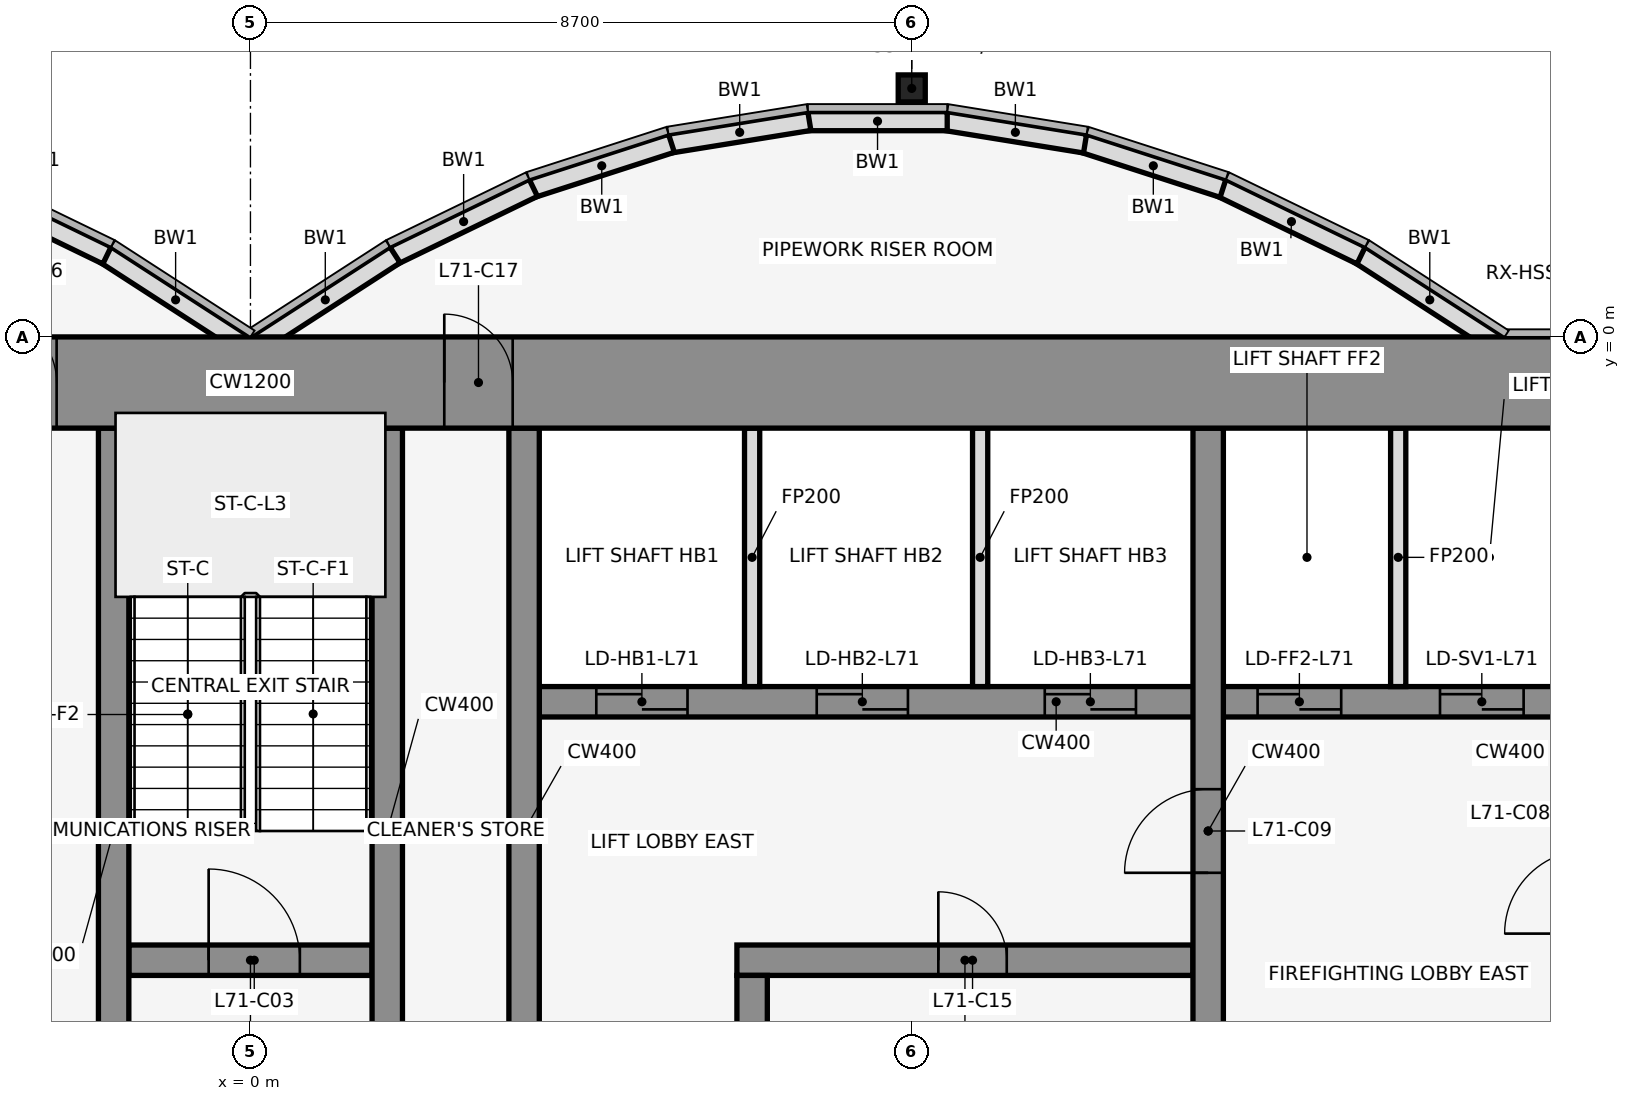
"""IFC4 building model, lengths in metres.
Left out: names, types, materials, properties, quantities, classifications, styles, units other than length and angle.
Written with IfcOpenShell. Run it as: python <this file> out.ifc"""

import sys

from ifc_helpers import new_model, si_unit, direction, frame, frame_2d, origin, origin_2d, place, context, subcontext, project, spatial, rectangle, hollow_rectangle, extrude, element, fill, save


model = new_model("IFC4")
c1 = context("Model", 3, precision=1e-05, world=origin(), true_north=direction((0.0, 1.0)))
c2 = subcontext(c1, "Body", "Model", "MODEL_VIEW")
j1 = project(units=[si_unit("LENGTHUNIT", "METRE"), si_unit("PLANEANGLEUNIT", "RADIAN")], contexts=[c1])
p1 = place(None, origin())
s1 = spatial("IfcSite", under=j1, at=p1, CompositionType="ELEMENT")
p2 = place(p1, origin())
s2 = spatial("IfcBuilding", under=s1, at=p2, CompositionType="ELEMENT")
p3 = place(p2, frame((0.0, 0.0, 315.5)))
s3 = spatial("IfcBuildingStorey", under=s2, at=p3, CompositionType="ELEMENT", Elevation=315.5)
p4 = place(p3, frame((8.7, 3.269, 0.0), z_axis=(0.0, 0.0, 1.0), x_axis=(1.0, 0.0, 0.0)))
e1 = element("IfcColumn", 1, at=p4, inside=s3, PredefinedType="COLUMN", context=c2, shape_type="SweptSolid", body=[
    extrude(hollow_rectangle(XDim=0.356, YDim=0.356, WallThickness=0.012, at=origin_2d()), origin(), (0.0, 0.0, 1.0), 4.5),
])
p5 = place(p3, frame((16.432, -0.105, 0.0), z_axis=(0.0, 0.0, 1.0), x_axis=(-0.83981312244, 0.542875602121, 0.0)))
e2 = element("IfcWall", 2, at=p5, inside=s3, PredefinedType="STANDARD", context=c2, shape_type="SweptSolid", body=[
    extrude(rectangle(XDim=2.183, YDim=0.25, at=frame_2d((1.091, 0.0))), origin(), (0.0, 0.0, 1.0), 4.35),
])
p6 = place(p3, frame((14.612, 1.073, 0.0), z_axis=(0.0, 0.0, 1.0), x_axis=(-0.89982408427, 0.436252928206, 0.0)))
e3 = element("IfcWall", 3, at=p6, inside=s3, PredefinedType="STANDARD", context=c2, shape_type="SweptSolid", body=[
    extrude(rectangle(XDim=2.038, YDim=0.25, at=frame_2d((1.019, 0.0))), origin(), (0.0, 0.0, 1.0), 4.35),
])
p7 = place(p3, frame((12.795, 1.955, 0.0), z_axis=(0.0, 0.0, 1.0), x_axis=(-0.951495806175, 0.307661714928, 0.0)))
e4 = element("IfcWall", 4, at=p7, inside=s3, PredefinedType="STANDARD", context=c2, shape_type="SweptSolid", body=[
    extrude(rectangle(XDim=1.927, YDim=0.25, at=frame_2d((0.963, 0.0))), origin(), (0.0, 0.0, 1.0), 4.35),
])
p8 = place(p3, frame((10.98, 2.543, 0.0), z_axis=(0.0, 0.0, 1.0), x_axis=(-0.987181718931, 0.159600293885, 0.0)))
e5 = element("IfcWall", 5, at=p8, inside=s3, PredefinedType="STANDARD", context=c2, shape_type="SweptSolid", body=[
    extrude(rectangle(XDim=1.857, YDim=0.25, at=frame_2d((0.929, 0.0))), origin(), (0.0, 0.0, 1.0), 4.35),
])
p9 = place(p3, frame((9.167, 2.838, 0.0), z_axis=(0.0, 0.0, 1.0), x_axis=(-1.0, 0.0, 0.0)))
e6 = element("IfcWall", 6, at=p9, inside=s3, PredefinedType="STANDARD", context=c2, shape_type="SweptSolid", body=[
    extrude(rectangle(XDim=1.833, YDim=0.25, at=frame_2d((0.917, 0.0))), origin(), (0.0, 0.0, 1.0), 4.35),
])
p10 = place(p3, frame((7.353, 2.84, 0.0), z_axis=(0.0, 0.0, 1.0), x_axis=(-0.987181718931, -0.159600293885, 0.0)))
e7 = element("IfcWall", 7, at=p10, inside=s3, PredefinedType="STANDARD", context=c2, shape_type="SweptSolid", body=[
    extrude(rectangle(XDim=1.857, YDim=0.25, at=frame_2d((0.929, 0.0))), origin(), (0.0, 0.0, 1.0), 4.35),
])
p11 = place(p3, frame((5.538, 2.548, 0.0), z_axis=(0.0, 0.0, 1.0), x_axis=(-0.951495806175, -0.307661714928, 0.0)))
e8 = element("IfcWall", 8, at=p11, inside=s3, PredefinedType="STANDARD", context=c2, shape_type="SweptSolid", body=[
    extrude(rectangle(XDim=1.927, YDim=0.25, at=frame_2d((0.963, 0.0))), origin(), (0.0, 0.0, 1.0), 4.35),
])
p12 = place(p3, frame((3.721, 1.962, 0.0), z_axis=(0.0, 0.0, 1.0), x_axis=(-0.89982408427, -0.436252928206, 0.0)))
e9 = element("IfcWall", 9, at=p12, inside=s3, PredefinedType="STANDARD", context=c2, shape_type="SweptSolid", body=[
    extrude(rectangle(XDim=2.038, YDim=0.25, at=frame_2d((1.019, 0.0))), origin(), (0.0, 0.0, 1.0), 4.35),
])
for number, where, z_axis, x_axis in (
    (10, (1.901, 1.08, 0.0), (0.0, 0.0, 1.0), (-0.84, -0.543, 0.0)),
    (11, (-0.068, -0.105, 0.0), (0.0, 0.0, 1.0), (-0.84, 0.543, 0.0)),
):
    element("IfcWall", number, at=place(p3, frame(where, z_axis=z_axis, x_axis=x_axis)), inside=s3, PredefinedType="STANDARD", context=c2, shape_type="SweptSolid", body=[
        extrude(rectangle(XDim=2.183, YDim=0.25, at=frame_2d((1.091, 0.0))), origin(), (0.0, 0.0, 1.0), 4.35),
    ])
p13 = place(p3, frame((-1.888, 1.073, 0.0), z_axis=(0.0, 0.0, 1.0), x_axis=(-0.89982408427, 0.436252928206, 0.0)))
e12 = element("IfcWall", 12, at=p13, inside=s3, PredefinedType="STANDARD", context=c2, shape_type="SweptSolid", body=[
    extrude(rectangle(XDim=2.038, YDim=0.25, at=frame_2d((1.019, 0.0))), origin(), (0.0, 0.0, 1.0), 4.35),
])
p14 = place(p3, frame((-1.6, -8.2, 0.0), z_axis=(0.0, 0.0, 1.0), x_axis=(1.0, 0.0, 0.0)))
e13 = element("IfcWall", 13, at=p14, inside=s3, PredefinedType="SHEAR", context=c2, shape_type="SweptSolid", body=[
    extrude(rectangle(XDim=3.2, YDim=0.4, at=frame_2d((1.6, 0.0))), origin(), (0.0, 0.0, 1.0), 4.5),
])
p15 = place(p14, frame((1.05, 0.0, 0.0)))
e14 = element("IfcOpeningElement", 14, at=p15, cuts=e13, PredefinedType="OPENING", context=c2, shape_type="SweptSolid", body=[
    extrude(rectangle(XDim=1.2, YDim=2.1, at=frame_2d((0.6, 1.05))), frame((0.0, 0.212, 0.0), z_axis=(0.0, -1.0, 0.0), x_axis=(1.0, 0.0, 0.0)), (0.0, 0.0, 1.0), 0.424),
])
p16 = place(p3, frame((6.4, -8.2, 0.0), z_axis=(0.0, 0.0, 1.0), x_axis=(1.0, 0.0, 0.0)))
e15 = element("IfcWall", 15, at=p16, inside=s3, PredefinedType="SHEAR", context=c2, shape_type="SweptSolid", body=[
    extrude(rectangle(XDim=6.0, YDim=0.4, at=frame_2d((3.0, 0.0))), origin(), (0.0, 0.0, 1.0), 4.5),
])
p17 = place(p16, frame((2.65, 0.0, 0.0)))
e16 = element("IfcOpeningElement", 16, at=p17, cuts=e15, PredefinedType="OPENING", context=c2, shape_type="SweptSolid", body=[
    extrude(rectangle(XDim=0.9, YDim=2.1, at=frame_2d((0.45, 1.05))), frame((0.0, 0.212, 0.0), z_axis=(0.0, -1.0, 0.0), x_axis=(1.0, 0.0, 0.0)), (0.0, 0.0, 1.0), 0.424),
])
p18 = place(p3, frame((3.8, -4.8, 0.0), z_axis=(0.0, 0.0, 1.0), x_axis=(1.0, 0.0, 0.0)))
e17 = element("IfcWall", 17, at=p18, inside=s3, PredefinedType="SHEAR", context=c2, shape_type="SweptSolid", body=[
    extrude(rectangle(XDim=13.6, YDim=0.4, at=frame_2d((6.8, 0.0))), origin(), (0.0, 0.0, 1.0), 4.5),
])
p19 = place(p18, frame((0.75, 0.0, 0.0)))
e18 = element("IfcOpeningElement", 18, at=p19, cuts=e17, PredefinedType="OPENING", context=c2, shape_type="SweptSolid", body=[
    extrude(rectangle(XDim=1.2, YDim=2.1, at=frame_2d((0.6, 1.05))), frame((0.0, 0.212, 0.0), z_axis=(0.0, -1.0, 0.0), x_axis=(1.0, 0.0, 0.0)), (0.0, 0.0, 1.0), 0.424),
])
p20 = place(p18, frame((3.65, 0.0, 0.0)))
e19 = element("IfcOpeningElement", 19, at=p20, cuts=e17, PredefinedType="OPENING", context=c2, shape_type="SweptSolid", body=[
    extrude(rectangle(XDim=1.2, YDim=2.1, at=frame_2d((0.6, 1.05))), frame((0.0, 0.212, 0.0), z_axis=(0.0, -1.0, 0.0), x_axis=(1.0, 0.0, 0.0)), (0.0, 0.0, 1.0), 0.424),
])
p21 = place(p18, frame((6.65, 0.0, 0.0)))
e20 = element("IfcOpeningElement", 20, at=p21, cuts=e17, PredefinedType="OPENING", context=c2, shape_type="SweptSolid", body=[
    extrude(rectangle(XDim=1.2, YDim=2.1, at=frame_2d((0.6, 1.05))), frame((0.0, 0.212, 0.0), z_axis=(0.0, -1.0, 0.0), x_axis=(1.0, 0.0, 0.0)), (0.0, 0.0, 1.0), 0.424),
])
p22 = place(p18, frame((9.45, 0.0, 0.0)))
e21 = element("IfcOpeningElement", 21, at=p22, cuts=e17, PredefinedType="OPENING", context=c2, shape_type="SweptSolid", body=[
    extrude(rectangle(XDim=1.1, YDim=2.1, at=frame_2d((0.55, 1.05))), frame((0.0, 0.212, 0.0), z_axis=(0.0, -1.0, 0.0), x_axis=(1.0, 0.0, 0.0)), (0.0, 0.0, 1.0), 0.424),
])
p23 = place(p18, frame((11.85, 0.0, 0.0)))
e22 = element("IfcOpeningElement", 22, at=p23, cuts=e17, PredefinedType="OPENING", context=c2, shape_type="SweptSolid", body=[
    extrude(rectangle(XDim=1.1, YDim=2.1, at=frame_2d((0.55, 1.05))), frame((0.0, 0.212, 0.0), z_axis=(0.0, -1.0, 0.0), x_axis=(1.0, 0.0, 0.0)), (0.0, 0.0, 1.0), 0.424),
])
for number, where, z_axis, x_axis in (
    (23, (-1.8, -11.8, 0.0), (0.0, 0.0, 1.0), (0.0, 1.0, 0.0)),
    (24, (1.8, -11.8, 0.0), (0.0, 0.0, 1.0), (0.0, 1.0, 0.0)),
):
    element("IfcWall", number, at=place(p3, frame(where, z_axis=z_axis, x_axis=x_axis)), inside=s3, PredefinedType="SHEAR", context=c2, shape_type="SweptSolid", body=[
        extrude(rectangle(XDim=10.6, YDim=0.4, at=frame_2d((5.3, 0.0))), origin(), (0.0, 0.0, 1.0), 4.5),
    ])
p24 = place(p3, frame((3.6, -11.8, 0.0), z_axis=(0.0, 0.0, 1.0), x_axis=(0.0, 1.0, 0.0)))
e25 = element("IfcWall", 25, at=p24, inside=s3, PredefinedType="SHEAR", context=c2, shape_type="SweptSolid", body=[
    extrude(rectangle(XDim=10.6, YDim=0.4, at=frame_2d((5.3, 0.0))), origin(), (0.0, 0.0, 1.0), 4.5),
])
p25 = place(p24, frame((1.35, 0.0, 0.0)))
e26 = element("IfcOpeningElement", 26, at=p25, cuts=e25, PredefinedType="OPENING", context=c2, shape_type="SweptSolid", body=[
    extrude(rectangle(XDim=0.9, YDim=2.1, at=frame_2d((0.45, 1.05))), frame((0.0, 0.212, 0.0), z_axis=(0.0, -1.0, 0.0), x_axis=(1.0, 0.0, 0.0)), (0.0, 0.0, 1.0), 0.424),
])
p26 = place(p3, frame((6.6, -11.8, 0.0), z_axis=(0.0, 0.0, 1.0), x_axis=(0.0, 1.0, 0.0)))
e27 = element("IfcWall", 27, at=p26, inside=s3, PredefinedType="SHEAR", context=c2, shape_type="SweptSolid", body=[
    extrude(rectangle(XDim=3.4, YDim=0.4, at=frame_2d((1.7, 0.0))), origin(), (0.0, 0.0, 1.0), 4.5),
])
for number, where, z_axis, x_axis in (
    (28, (6.6, -4.6, 0.0), (0.0, 0.0, 1.0), (0.0, 1.0, 0.0)),
    (29, (9.6, -4.6, 0.0), (0.0, 0.0, 1.0), (0.0, 1.0, 0.0)),
):
    element("IfcWall", number, at=place(p3, frame(where, z_axis=z_axis, x_axis=x_axis)), inside=s3, PredefinedType="PARTITIONING", context=c2, shape_type="SweptSolid", body=[
        extrude(rectangle(XDim=3.4, YDim=0.2, at=frame_2d((1.7, 0.0))), origin(), (0.0, 0.0, 1.0), 3.418),
    ])
p27 = place(p3, frame((12.6, -11.8, 0.0), z_axis=(0.0, 0.0, 1.0), x_axis=(0.0, 1.0, 0.0)))
e30 = element("IfcWall", 30, at=p27, inside=s3, PredefinedType="SHEAR", context=c2, shape_type="SweptSolid", body=[
    extrude(rectangle(XDim=10.6, YDim=0.4, at=frame_2d((5.3, 0.0))), origin(), (0.0, 0.0, 1.0), 4.5),
])
p28 = place(p27, frame((4.75, 0.0, 0.0)))
e31 = element("IfcOpeningElement", 31, at=p28, cuts=e30, PredefinedType="OPENING", context=c2, shape_type="SweptSolid", body=[
    extrude(rectangle(XDim=1.1, YDim=2.1, at=frame_2d((0.55, 1.05))), frame((0.0, 0.212, 0.0), z_axis=(0.0, -1.0, 0.0), x_axis=(1.0, 0.0, 0.0)), (0.0, 0.0, 1.0), 0.424),
])
p29 = place(p3, frame((15.1, -4.6, 0.0), z_axis=(0.0, 0.0, 1.0), x_axis=(0.0, 1.0, 0.0)))
e32 = element("IfcWall", 32, at=p29, inside=s3, PredefinedType="PARTITIONING", context=c2, shape_type="SweptSolid", body=[
    extrude(rectangle(XDim=3.4, YDim=0.2, at=frame_2d((1.7, 0.0))), origin(), (0.0, 0.0, 1.0), 3.418),
])
p30 = place(p3, frame((-22.0, -0.6, 0.0), z_axis=(0.0, 0.0, 1.0), x_axis=(1.0, 0.0, 0.0)))
e33 = element("IfcWall", 33, at=p30, inside=s3, PredefinedType="SHEAR", context=c2, shape_type="SweptSolid", body=[
    extrude(rectangle(XDim=44.0, YDim=1.2, at=frame_2d((22.0, 0.0))), origin(), (0.0, 0.0, 1.0), 4.5),
])
p31 = place(p30, frame((18.55, 0.0, 0.0)))
e34 = element("IfcOpeningElement", 34, at=p31, cuts=e33, PredefinedType="OPENING", context=c2, shape_type="SweptSolid", body=[
    extrude(rectangle(XDim=0.9, YDim=2.1, at=frame_2d((0.45, 1.05))), frame((0.0, 0.612, 0.0), z_axis=(0.0, -1.0, 0.0), x_axis=(1.0, 0.0, 0.0)), (0.0, 0.0, 1.0), 1.224),
])
p32 = place(p30, frame((24.55, 0.0, 0.0)))
e35 = element("IfcOpeningElement", 35, at=p32, cuts=e33, PredefinedType="OPENING", context=c2, shape_type="SweptSolid", body=[
    extrude(rectangle(XDim=0.9, YDim=2.1, at=frame_2d((0.45, 1.05))), frame((0.0, 0.612, 0.0), z_axis=(0.0, -1.0, 0.0), x_axis=(1.0, 0.0, 0.0)), (0.0, 0.0, 1.0), 1.224),
])
p33 = place(p15, origin())
e36 = element("IfcDoor", 36, at=p33, inside=s3, OperationType="SINGLE_SWING_LEFT", PredefinedType="DOOR", context=c2, shape_type="SweptSolid", body=[
    extrude(rectangle(XDim=1.2, YDim=2.1, at=frame_2d((0.6, 1.05))), frame((0.0, 0.025, 0.0), z_axis=(0.0, -1.0, 0.0), x_axis=(1.0, 0.0, 0.0)), (0.0, 0.0, 1.0), 0.05),
])
fill(e14, e36)
p34 = place(p19, origin())
e37 = element("IfcDoor", 37, at=p34, inside=s3, OperationType="DOUBLE_DOOR_SLIDING", PredefinedType="DOOR", context=c2, shape_type="SweptSolid", body=[
    extrude(rectangle(XDim=1.2, YDim=2.1, at=frame_2d((0.6, 1.05))), frame((0.0, 0.025, 0.0), z_axis=(0.0, -1.0, 0.0), x_axis=(1.0, 0.0, 0.0)), (0.0, 0.0, 1.0), 0.05),
])
fill(e18, e37)
p35 = place(p20, origin())
e38 = element("IfcDoor", 38, at=p35, inside=s3, OperationType="DOUBLE_DOOR_SLIDING", PredefinedType="DOOR", context=c2, shape_type="SweptSolid", body=[
    extrude(rectangle(XDim=1.2, YDim=2.1, at=frame_2d((0.6, 1.05))), frame((0.0, 0.025, 0.0), z_axis=(0.0, -1.0, 0.0), x_axis=(1.0, 0.0, 0.0)), (0.0, 0.0, 1.0), 0.05),
])
fill(e19, e38)
p36 = place(p21, origin())
e39 = element("IfcDoor", 39, at=p36, inside=s3, OperationType="DOUBLE_DOOR_SLIDING", PredefinedType="DOOR", context=c2, shape_type="SweptSolid", body=[
    extrude(rectangle(XDim=1.2, YDim=2.1, at=frame_2d((0.6, 1.05))), frame((0.0, 0.025, 0.0), z_axis=(0.0, -1.0, 0.0), x_axis=(1.0, 0.0, 0.0)), (0.0, 0.0, 1.0), 0.05),
])
fill(e20, e39)
p37 = place(p22, origin())
e40 = element("IfcDoor", 40, at=p37, inside=s3, OperationType="DOUBLE_DOOR_SLIDING", PredefinedType="DOOR", context=c2, shape_type="SweptSolid", body=[
    extrude(rectangle(XDim=1.1, YDim=2.1, at=frame_2d((0.55, 1.05))), frame((0.0, 0.025, 0.0), z_axis=(0.0, -1.0, 0.0), x_axis=(1.0, 0.0, 0.0)), (0.0, 0.0, 1.0), 0.05),
])
fill(e21, e40)
p38 = place(p23, origin())
e41 = element("IfcDoor", 41, at=p38, inside=s3, OperationType="DOUBLE_DOOR_SLIDING", PredefinedType="DOOR", context=c2, shape_type="SweptSolid", body=[
    extrude(rectangle(XDim=1.1, YDim=2.1, at=frame_2d((0.55, 1.05))), frame((0.0, 0.025, 0.0), z_axis=(0.0, -1.0, 0.0), x_axis=(1.0, 0.0, 0.0)), (0.0, 0.0, 1.0), 0.05),
])
fill(e22, e41)
p39 = place(p28, frame((1.1, 0.0, 0.0), z_axis=(0.0, 0.0, 1.0), x_axis=(-1.0, 0.0, 0.0)))
e42 = element("IfcDoor", 42, at=p39, inside=s3, OperationType="SINGLE_SWING_RIGHT", PredefinedType="DOOR", context=c2, shape_type="SweptSolid", body=[
    extrude(rectangle(XDim=1.1, YDim=2.1, at=frame_2d((0.55, 1.05))), frame((0.0, 0.025, 0.0), z_axis=(0.0, -1.0, 0.0), x_axis=(1.0, 0.0, 0.0)), (0.0, 0.0, 1.0), 0.05),
])
fill(e31, e42)
p40 = place(p17, frame((0.9, 0.0, 0.0), z_axis=(0.0, 0.0, 1.0), x_axis=(-1.0, 0.0, 0.0)))
e43 = element("IfcDoor", 43, at=p40, inside=s3, OperationType="SINGLE_SWING_RIGHT", PredefinedType="DOOR", context=c2, shape_type="SweptSolid", body=[
    extrude(rectangle(XDim=0.9, YDim=2.1, at=frame_2d((0.45, 1.05))), frame((0.0, 0.025, 0.0), z_axis=(0.0, -1.0, 0.0), x_axis=(1.0, 0.0, 0.0)), (0.0, 0.0, 1.0), 0.05),
])
fill(e16, e43)
p41 = place(p31, origin())
e44 = element("IfcDoor", 44, at=p41, inside=s3, OperationType="SINGLE_SWING_LEFT", PredefinedType="DOOR", context=c2, shape_type="SweptSolid", body=[
    extrude(rectangle(XDim=0.9, YDim=2.1, at=frame_2d((0.45, 1.05))), frame((0.0, 0.025, 0.0), z_axis=(0.0, -1.0, 0.0), x_axis=(1.0, 0.0, 0.0)), (0.0, 0.0, 1.0), 0.05),
])
fill(e34, e44)
p42 = place(p32, origin())
e45 = element("IfcDoor", 45, at=p42, inside=s3, OperationType="SINGLE_SWING_LEFT", PredefinedType="DOOR", context=c2, shape_type="SweptSolid", body=[
    extrude(rectangle(XDim=0.9, YDim=2.1, at=frame_2d((0.45, 1.05))), frame((0.0, 0.025, 0.0), z_axis=(0.0, -1.0, 0.0), x_axis=(1.0, 0.0, 0.0)), (0.0, 0.0, 1.0), 0.05),
])
fill(e35, e45)
save(model, sys.argv[1])
